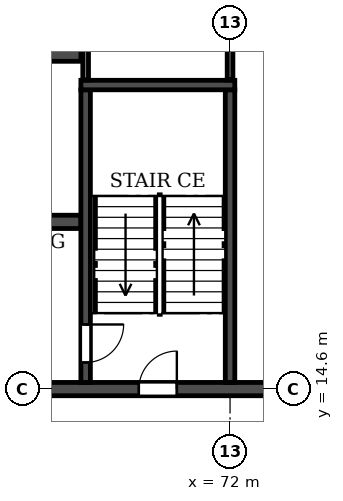
"""IFC4 building model, lengths in metres.
Left out: names, types, materials, properties, quantities, classifications, styles, units other than length and angle.
Written with IfcOpenShell. Run it as: python <this file> out.ifc"""

import sys

from ifc_helpers import new_model, si_unit, direction, frame, frame_2d, origin, place, context, subcontext, project, spatial, rectangle, extrude, element, fill, save


model = new_model("IFC4")
c1 = context("Model", 3, precision=1e-05, world=origin(), true_north=direction((0.0, 1.0)))
c2 = subcontext(c1, "Body", "Model", "MODEL_VIEW")
j1 = project(units=[si_unit("LENGTHUNIT", "METRE"), si_unit("PLANEANGLEUNIT", "RADIAN")], contexts=[c1])
p1 = place(None, origin())
s1 = spatial("IfcSite", under=j1, at=p1, CompositionType="ELEMENT")
p2 = place(p1, origin())
s2 = spatial("IfcBuilding", under=s1, at=p2, CompositionType="ELEMENT")
p3 = place(p2, frame((0.0, 0.0, 221.4)))
s3 = spatial("IfcBuildingStorey", under=s2, at=p3, CompositionType="ELEMENT", Elevation=221.4)
p4 = place(p3, frame((18.2, 14.6, 0.0), z_axis=(0.0, 0.0, 1.0), x_axis=(1.0, 0.0, 0.0)))
e1 = element("IfcWall", 1, at=p4, inside=s3, PredefinedType="SOLIDWALL", context=c2, shape_type="SweptSolid", body=[
    extrude(rectangle(XDim=65.6, YDim=0.35, at=frame_2d((32.8, 0.0))), origin(), (0.0, 0.0, 1.0), 3.08),
])
p5 = place(p4, frame((0.7, 0.0, 0.0)))
e2 = element("IfcOpeningElement", 2, at=p5, cuts=e1, PredefinedType="OPENING", context=c2, shape_type="SweptSolid", body=[
    extrude(rectangle(XDim=1.0, YDim=2.1, at=frame_2d((0.5, 1.05))), frame((0.0, 0.185, 0.0), z_axis=(0.0, -1.0, 0.0), x_axis=(1.0, 0.0, 0.0)), (0.0, 0.0, 1.0), 0.37),
])
p6 = place(p4, frame((8.6, 0.0, 0.0)))
e3 = element("IfcOpeningElement", 3, at=p6, cuts=e1, PredefinedType="OPENING", context=c2, shape_type="SweptSolid", body=[
    extrude(rectangle(XDim=1.0, YDim=2.1, at=frame_2d((0.5, 1.05))), frame((0.0, 0.185, 0.0), z_axis=(0.0, -1.0, 0.0), x_axis=(1.0, 0.0, 0.0)), (0.0, 0.0, 1.0), 0.37),
])
p7 = place(p4, frame((13.2, 0.0, 0.0)))
e4 = element("IfcOpeningElement", 4, at=p7, cuts=e1, PredefinedType="OPENING", context=c2, shape_type="SweptSolid", body=[
    extrude(rectangle(XDim=1.0, YDim=2.1, at=frame_2d((0.5, 1.05))), frame((0.0, 0.185, 0.0), z_axis=(0.0, -1.0, 0.0), x_axis=(1.0, 0.0, 0.0)), (0.0, 0.0, 1.0), 0.37),
])
p8 = place(p4, frame((27.1, 0.0, 0.0)))
e5 = element("IfcOpeningElement", 5, at=p8, cuts=e1, PredefinedType="OPENING", context=c2, shape_type="SweptSolid", body=[
    extrude(rectangle(XDim=1.0, YDim=2.1, at=frame_2d((0.5, 1.05))), frame((0.0, 0.185, 0.0), z_axis=(0.0, -1.0, 0.0), x_axis=(1.0, 0.0, 0.0)), (0.0, 0.0, 1.0), 0.37),
])
p9 = place(p4, frame((32.3, 0.0, 0.0)))
e6 = element("IfcOpeningElement", 6, at=p9, cuts=e1, PredefinedType="OPENING", context=c2, shape_type="SweptSolid", body=[
    extrude(rectangle(XDim=1.0, YDim=2.1, at=frame_2d((0.5, 1.05))), frame((0.0, 0.185, 0.0), z_axis=(0.0, -1.0, 0.0), x_axis=(1.0, 0.0, 0.0)), (0.0, 0.0, 1.0), 0.37),
])
p10 = place(p4, frame((35.95, 0.0, 0.0)))
e7 = element("IfcOpeningElement", 7, at=p10, cuts=e1, PredefinedType="OPENING", context=c2, shape_type="SweptSolid", body=[
    extrude(rectangle(XDim=1.5, YDim=2.1, at=frame_2d((0.75, 1.05))), frame((0.0, 0.185, 0.0), z_axis=(0.0, -1.0, 0.0), x_axis=(1.0, 0.0, 0.0)), (0.0, 0.0, 1.0), 0.37),
])
p11 = place(p4, frame((40.1, 0.0, 0.0)))
e8 = element("IfcOpeningElement", 8, at=p11, cuts=e1, PredefinedType="OPENING", context=c2, shape_type="SweptSolid", body=[
    extrude(rectangle(XDim=1.0, YDim=2.1, at=frame_2d((0.5, 1.05))), frame((0.0, 0.185, 0.0), z_axis=(0.0, -1.0, 0.0), x_axis=(1.0, 0.0, 0.0)), (0.0, 0.0, 1.0), 0.37),
])
p12 = place(p4, frame((51.4, 0.0, 0.0)))
e9 = element("IfcOpeningElement", 9, at=p12, cuts=e1, PredefinedType="OPENING", context=c2, shape_type="SweptSolid", body=[
    extrude(rectangle(XDim=1.0, YDim=2.1, at=frame_2d((0.5, 1.05))), frame((0.0, 0.185, 0.0), z_axis=(0.0, -1.0, 0.0), x_axis=(1.0, 0.0, 0.0)), (0.0, 0.0, 1.0), 0.37),
])
p13 = place(p4, frame((56.0, 0.0, 0.0)))
e10 = element("IfcOpeningElement", 10, at=p13, cuts=e1, PredefinedType="OPENING", context=c2, shape_type="SweptSolid", body=[
    extrude(rectangle(XDim=1.0, YDim=2.1, at=frame_2d((0.5, 1.05))), frame((0.0, 0.185, 0.0), z_axis=(0.0, -1.0, 0.0), x_axis=(1.0, 0.0, 0.0)), (0.0, 0.0, 1.0), 0.37),
])
p14 = place(p4, frame((63.9, 0.0, 0.0)))
e11 = element("IfcOpeningElement", 11, at=p14, cuts=e1, PredefinedType="OPENING", context=c2, shape_type="SweptSolid", body=[
    extrude(rectangle(XDim=1.0, YDim=2.1, at=frame_2d((0.5, 1.05))), frame((0.0, 0.185, 0.0), z_axis=(0.0, -1.0, 0.0), x_axis=(1.0, 0.0, 0.0)), (0.0, 0.0, 1.0), 0.37),
])
p15 = place(p3, frame((33.925, 19.0, 0.0), z_axis=(0.0, 0.0, 1.0), x_axis=(1.0, 0.0, 0.0)))
e12 = element("IfcWall", 12, at=p15, inside=s3, PredefinedType="SOLIDWALL", context=c2, shape_type="SweptSolid", body=[
    extrude(rectangle(XDim=34.15, YDim=0.35, at=frame_2d((17.075, 0.0))), origin(), (0.0, 0.0, 1.0), 3.08),
])
p16 = place(p15, frame((16.175, 0.0, 0.0)))
e13 = element("IfcOpeningElement", 13, at=p16, cuts=e12, PredefinedType="OPENING", context=c2, shape_type="SweptSolid", body=[
    extrude(rectangle(XDim=1.8, YDim=2.1, at=frame_2d((0.9, 1.05))), frame((0.0, 0.185, 0.0), z_axis=(0.0, -1.0, 0.0), x_axis=(1.0, 0.0, 0.0)), (0.0, 0.0, 1.0), 0.37),
])
p17 = place(p15, frame((1.525, 0.0, 0.0)))
e14 = element("IfcOpeningElement", 14, at=p17, cuts=e12, PredefinedType="OPENING", context=c2, shape_type="SweptSolid", body=[
    extrude(rectangle(XDim=1.8, YDim=2.1, at=frame_2d((0.9, 1.05))), frame((0.0, 0.185, 0.0), z_axis=(0.0, -1.0, 0.0), x_axis=(1.0, 0.0, 0.0)), (0.0, 0.0, 1.0), 0.37),
])
p18 = place(p15, frame((30.825, 0.0, 0.0)))
e15 = element("IfcOpeningElement", 15, at=p18, cuts=e12, PredefinedType="OPENING", context=c2, shape_type="SweptSolid", body=[
    extrude(rectangle(XDim=1.8, YDim=2.1, at=frame_2d((0.9, 1.05))), frame((0.0, 0.185, 0.0), z_axis=(0.0, -1.0, 0.0), x_axis=(1.0, 0.0, 0.0)), (0.0, 0.0, 1.0), 0.37),
])
p19 = place(p3, frame((33.925, 23.4, 0.0), z_axis=(0.0, 0.0, 1.0), x_axis=(1.0, 0.0, 0.0)))
e16 = element("IfcWall", 16, at=p19, inside=s3, PredefinedType="SOLIDWALL", context=c2, shape_type="SweptSolid", body=[
    extrude(rectangle(XDim=34.15, YDim=0.35, at=frame_2d((17.075, 0.0))), origin(), (0.0, 0.0, 1.0), 3.08),
])
p20 = place(p19, frame((16.175, 0.0, 0.0)))
e17 = element("IfcOpeningElement", 17, at=p20, cuts=e16, PredefinedType="OPENING", context=c2, shape_type="SweptSolid", body=[
    extrude(rectangle(XDim=1.8, YDim=2.1, at=frame_2d((0.9, 1.05))), frame((0.0, 0.185, 0.0), z_axis=(0.0, -1.0, 0.0), x_axis=(1.0, 0.0, 0.0)), (0.0, 0.0, 1.0), 0.37),
])
p21 = place(p19, frame((0.625, 0.0, 0.0)))
e18 = element("IfcOpeningElement", 18, at=p21, cuts=e16, PredefinedType="OPENING", context=c2, shape_type="SweptSolid", body=[
    extrude(rectangle(XDim=1.1, YDim=2.1, at=frame_2d((0.55, 1.05))), frame((0.0, 0.185, 0.0), z_axis=(0.0, -1.0, 0.0), x_axis=(1.0, 0.0, 0.0)), (0.0, 0.0, 1.0), 0.37),
])
p22 = place(p19, frame((3.225, 0.0, 0.0)))
e19 = element("IfcOpeningElement", 19, at=p22, cuts=e16, PredefinedType="OPENING", context=c2, shape_type="SweptSolid", body=[
    extrude(rectangle(XDim=1.1, YDim=2.1, at=frame_2d((0.55, 1.05))), frame((0.0, 0.185, 0.0), z_axis=(0.0, -1.0, 0.0), x_axis=(1.0, 0.0, 0.0)), (0.0, 0.0, 1.0), 0.37),
])
p23 = place(p19, frame((5.825, 0.0, 0.0)))
e20 = element("IfcOpeningElement", 20, at=p23, cuts=e16, PredefinedType="OPENING", context=c2, shape_type="SweptSolid", body=[
    extrude(rectangle(XDim=1.1, YDim=2.1, at=frame_2d((0.55, 1.05))), frame((0.0, 0.185, 0.0), z_axis=(0.0, -1.0, 0.0), x_axis=(1.0, 0.0, 0.0)), (0.0, 0.0, 1.0), 0.37),
])
p24 = place(p19, frame((8.425, 0.0, 0.0)))
e21 = element("IfcOpeningElement", 21, at=p24, cuts=e16, PredefinedType="OPENING", context=c2, shape_type="SweptSolid", body=[
    extrude(rectangle(XDim=1.1, YDim=2.1, at=frame_2d((0.55, 1.05))), frame((0.0, 0.185, 0.0), z_axis=(0.0, -1.0, 0.0), x_axis=(1.0, 0.0, 0.0)), (0.0, 0.0, 1.0), 0.37),
])
p25 = place(p19, frame((11.025, 0.0, 0.0)))
e22 = element("IfcOpeningElement", 22, at=p25, cuts=e16, PredefinedType="OPENING", context=c2, shape_type="SweptSolid", body=[
    extrude(rectangle(XDim=1.1, YDim=2.1, at=frame_2d((0.55, 1.05))), frame((0.0, 0.185, 0.0), z_axis=(0.0, -1.0, 0.0), x_axis=(1.0, 0.0, 0.0)), (0.0, 0.0, 1.0), 0.37),
])
p26 = place(p19, frame((13.625, 0.0, 0.0)))
e23 = element("IfcOpeningElement", 23, at=p26, cuts=e16, PredefinedType="OPENING", context=c2, shape_type="SweptSolid", body=[
    extrude(rectangle(XDim=1.1, YDim=2.1, at=frame_2d((0.55, 1.05))), frame((0.0, 0.185, 0.0), z_axis=(0.0, -1.0, 0.0), x_axis=(1.0, 0.0, 0.0)), (0.0, 0.0, 1.0), 0.37),
])
p27 = place(p19, frame((27.225, 0.0, 0.0)))
e24 = element("IfcOpeningElement", 24, at=p27, cuts=e16, PredefinedType="OPENING", context=c2, shape_type="SweptSolid", body=[
    extrude(rectangle(XDim=1.1, YDim=2.1, at=frame_2d((0.55, 1.05))), frame((0.0, 0.185, 0.0), z_axis=(0.0, -1.0, 0.0), x_axis=(1.0, 0.0, 0.0)), (0.0, 0.0, 1.0), 0.37),
])
p28 = place(p3, frame((68.2, 14.775, 0.0), z_axis=(0.0, 0.0, 1.0), x_axis=(0.0, 1.0, 0.0)))
e25 = element("IfcWall", 25, at=p28, inside=s3, PredefinedType="SOLIDWALL", context=c2, shape_type="SweptSolid", body=[
    extrude(rectangle(XDim=7.7, YDim=0.25, at=frame_2d((3.85, 0.0))), origin(), (0.0, 0.0, 1.0), 3.08),
])
p29 = place(p28, frame((0.525, 0.0, 0.0)))
e26 = element("IfcOpeningElement", 26, at=p29, cuts=e25, PredefinedType="OPENING", context=c2, shape_type="SweptSolid", body=[
    extrude(rectangle(XDim=1.0, YDim=2.1, at=frame_2d((0.5, 1.05))), frame((0.0, 0.135, 0.0), z_axis=(0.0, -1.0, 0.0), x_axis=(1.0, 0.0, 0.0)), (0.0, 0.0, 1.0), 0.27),
])
p30 = place(p3, frame((72.0, 14.775, 0.0), z_axis=(0.0, 0.0, 1.0), x_axis=(0.0, 1.0, 0.0)))
e27 = element("IfcWall", 27, at=p30, inside=s3, PredefinedType="SOLIDWALL", context=c2, shape_type="SweptSolid", body=[
    extrude(rectangle(XDim=7.7, YDim=0.25, at=frame_2d((3.85, 0.0))), origin(), (0.0, 0.0, 1.0), 3.08),
])
p31 = place(p3, frame((68.075, 22.6, 0.0), z_axis=(0.0, 0.0, 1.0), x_axis=(1.0, 0.0, 0.0)))
e28 = element("IfcWall", 28, at=p31, inside=s3, PredefinedType="SOLIDWALL", context=c2, shape_type="SweptSolid", body=[
    extrude(rectangle(XDim=4.05, YDim=0.25, at=frame_2d((2.025, 0.0))), origin(), (0.0, 0.0, 1.0), 3.08),
])
for number, where, z_axis, x_axis in (
    (29, (68.2, 22.735, 0.0), (0.0, 0.0, 1.0), (0.0, 1.0, 0.0)),
    (30, (72.0, 22.735, 0.0), (0.0, 0.0, 1.0), (0.0, 1.0, 0.0)),
):
    element("IfcWall", number, at=place(p3, frame(where, z_axis=z_axis, x_axis=x_axis)), inside=s3, PredefinedType="PARTITIONING", context=c2, shape_type="SweptSolid", body=[
        extrude(rectangle(XDim=4.88, YDim=0.15, at=frame_2d((2.44, 0.0))), origin(), (0.0, 0.0, 1.0), 3.08),
    ])
p32 = place(p12, origin())
e31 = element("IfcDoor", 31, at=p32, inside=s3, OperationType="SINGLE_SWING_RIGHT", PredefinedType="DOOR", context=c2, shape_type="SweptSolid", body=[
    extrude(rectangle(XDim=1.0, YDim=2.1, at=frame_2d((0.5, 1.05))), frame((0.0, 0.025, 0.0), z_axis=(0.0, -1.0, 0.0), x_axis=(1.0, 0.0, 0.0)), (0.0, 0.0, 1.0), 0.05),
])
fill(e9, e31)
p33 = place(p29, frame((1.0, 0.0, 0.0), z_axis=(0.0, 0.0, 1.0), x_axis=(-1.0, 0.0, 0.0)))
e32 = element("IfcDoor", 32, at=p33, inside=s3, OperationType="SINGLE_SWING_LEFT", PredefinedType="DOOR", context=c2, shape_type="SweptSolid", body=[
    extrude(rectangle(XDim=1.0, YDim=2.1, at=frame_2d((0.5, 1.05))), frame((0.0, 0.025, 0.0), z_axis=(0.0, -1.0, 0.0), x_axis=(1.0, 0.0, 0.0)), (0.0, 0.0, 1.0), 0.05),
])
fill(e26, e32)
save(model, sys.argv[1])
